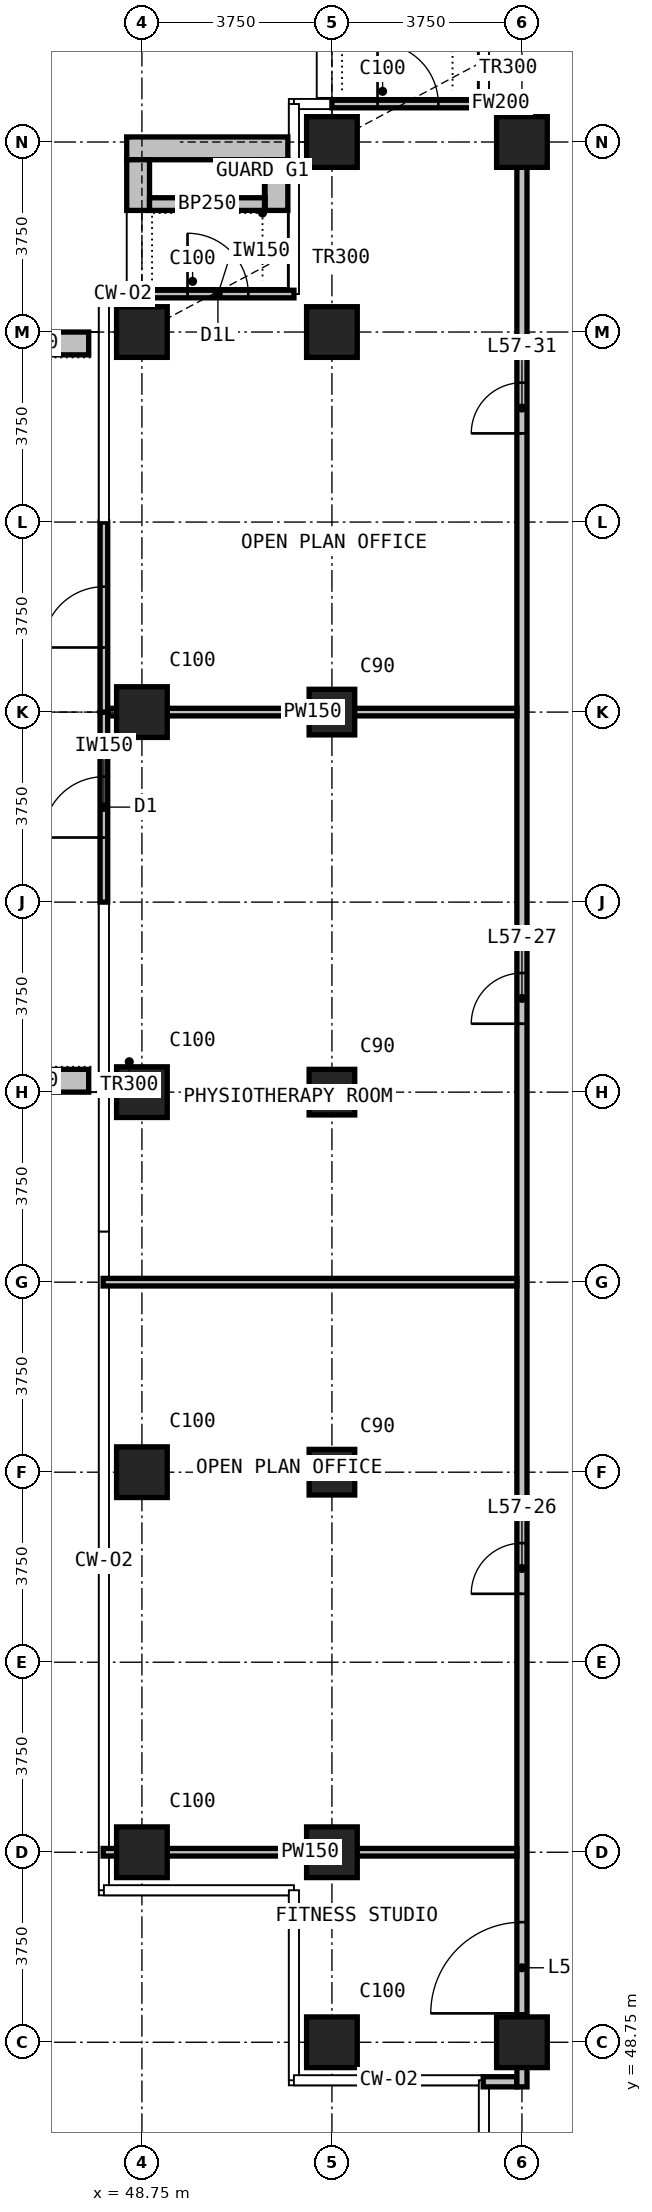
"""IFC4 building model, lengths in metres.
Left out: names, types, materials, properties, quantities, classifications, styles, units other than length and angle.
Written with IfcOpenShell. Run it as: python <this file> out.ifc"""

import sys

from ifc_helpers import new_model, si_unit, direction, frame, frame_2d, origin, origin_2d, place, context, subcontext, project, spatial, rectangle, extrude, element, fill, save


model = new_model("IFC4")
c1 = context("Model", 3, precision=1e-05, world=origin(), true_north=direction((0.0, 1.0)))
c2 = subcontext(c1, "Body", "Model", "MODEL_VIEW")
j1 = project(units=[si_unit("LENGTHUNIT", "METRE"), si_unit("PLANEANGLEUNIT", "RADIAN")], contexts=[c1])
p1 = place(None, origin())
s1 = spatial("IfcSite", under=j1, at=p1, CompositionType="ELEMENT")
p2 = place(p1, origin())
s2 = spatial("IfcBuilding", under=s1, at=p2, CompositionType="ELEMENT")
p3 = place(p2, frame((0.0, 0.0, 221.1)))
s3 = spatial("IfcBuildingStorey", under=s2, at=p3, CompositionType="ELEMENT", Elevation=221.1)
for number, where, z_axis, x_axis in (
    (1, (48.75, 52.5, 0.0), (0.0, 0.0, 1.0), (1.0, 0.0, 0.0)),
    (2, (48.75, 60.0, 0.0), (0.0, 0.0, 1.0), (1.0, 0.0, 0.0)),
    (3, (48.75, 67.5, 0.0), (0.0, 0.0, 1.0), (1.0, 0.0, 0.0)),
    (4, (48.75, 75.0, 0.0), (0.0, 0.0, 1.0), (1.0, 0.0, 0.0)),
    (5, (48.75, 82.5, 0.0), (0.0, 0.0, 1.0), (1.0, 0.0, 0.0)),
    (6, (52.5, 48.75, 0.0), (0.0, 0.0, 1.0), (1.0, 0.0, 0.0)),
    (7, (52.5, 52.5, 0.0), (0.0, 0.0, 1.0), (1.0, 0.0, 0.0)),
):
    element("IfcColumn", number, at=place(p3, frame(where, z_axis=z_axis, x_axis=x_axis)), inside=s3, PredefinedType="COLUMN", context=c2, shape_type="SweptSolid", body=[
        extrude(rectangle(XDim=1.0, YDim=1.0, at=origin_2d()), origin(), (0.0, 0.0, 1.0), 3.6),
    ])
for number, where, z_axis, x_axis in (
    (8, (52.5, 60.0, 0.0), (0.0, 0.0, 1.0), (1.0, 0.0, 0.0)),
    (9, (52.5, 67.5, 0.0), (0.0, 0.0, 1.0), (1.0, 0.0, 0.0)),
    (10, (52.5, 75.0, 0.0), (0.0, 0.0, 1.0), (1.0, 0.0, 0.0)),
):
    element("IfcColumn", number, at=place(p3, frame(where, z_axis=z_axis, x_axis=x_axis)), inside=s3, PredefinedType="COLUMN", context=c2, shape_type="SweptSolid", body=[
        extrude(rectangle(XDim=0.9, YDim=0.9, at=origin_2d()), origin(), (0.0, 0.0, 1.0), 3.6),
    ])
for number, where, z_axis, x_axis in (
    (11, (52.5, 82.5, 0.0), (0.0, 0.0, 1.0), (1.0, 0.0, 0.0)),
    (12, (52.5, 86.25, 0.0), (0.0, 0.0, 1.0), (1.0, 0.0, 0.0)),
    (13, (56.25, 48.75, 0.0), (0.0, 0.0, 1.0), (1.0, 0.0, 0.0)),
    (14, (56.25, 86.25, 0.0), (0.0, 0.0, 1.0), (1.0, 0.0, 0.0)),
):
    element("IfcColumn", number, at=place(p3, frame(where, z_axis=z_axis, x_axis=x_axis)), inside=s3, PredefinedType="COLUMN", context=c2, shape_type="SweptSolid", body=[
        extrude(rectangle(XDim=1.0, YDim=1.0, at=origin_2d()), origin(), (0.0, 0.0, 1.0), 3.6),
    ])
p4 = place(p3, frame((52.5, 87.0, 0.0), z_axis=(0.0, 0.0, 1.0), x_axis=(1.0, 0.0, 0.0)))
e15 = element("IfcWall", 15, at=p4, inside=s3, PredefinedType="SOLIDWALL", context=c2, shape_type="SweptSolid", body=[
    extrude(rectangle(XDim=3.0, YDim=0.15, at=frame_2d((1.5, 0.0))), origin(), (0.0, 0.0, 1.0), 3.3),
])
p5 = place(p4, frame((0.9, 0.0, 0.0)))
e16 = element("IfcOpeningElement", 16, at=p5, cuts=e15, PredefinedType="OPENING", context=c2, shape_type="SweptSolid", body=[
    extrude(rectangle(XDim=1.2, YDim=2.0, at=frame_2d((0.6, 1.0))), frame((0.0, 0.085, 0.0), z_axis=(0.0, -1.0, 0.0), x_axis=(1.0, 0.0, 0.0)), (0.0, 0.0, 1.0), 0.17),
])
p6 = place(p3, frame((48.75, 83.25, 0.0), z_axis=(0.0, 0.0, 1.0), x_axis=(1.0, 0.0, 0.0)))
e17 = element("IfcWall", 17, at=p6, inside=s3, PredefinedType="SOLIDWALL", context=c2, shape_type="SweptSolid", body=[
    extrude(rectangle(XDim=3.0, YDim=0.15, at=frame_2d((1.5, 0.0))), origin(), (0.0, 0.0, 1.0), 3.3),
])
p7 = place(p6, frame((0.9, 0.0, 0.0)))
e18 = element("IfcOpeningElement", 18, at=p7, cuts=e17, PredefinedType="OPENING", context=c2, shape_type="SweptSolid", body=[
    extrude(rectangle(XDim=1.2, YDim=2.0, at=frame_2d((0.6, 1.0))), frame((0.0, 0.085, 0.0), z_axis=(0.0, -1.0, 0.0), x_axis=(1.0, 0.0, 0.0)), (0.0, 0.0, 1.0), 0.17),
])
p8 = place(p3, frame((48.0, 71.25, 0.0), z_axis=(0.0, 0.0, 1.0), x_axis=(0.0, 1.0, 0.0)))
e19 = element("IfcWall", 19, at=p8, inside=s3, PredefinedType="SOLIDWALL", context=c2, shape_type="SweptSolid", body=[
    extrude(rectangle(XDim=3.75, YDim=0.15, at=frame_2d((1.875, 0.0))), origin(), (0.0, 0.0, 1.0), 3.3),
])
p9 = place(p8, frame((1.275, 0.0, 0.0)))
e20 = element("IfcOpeningElement", 20, at=p9, cuts=e19, PredefinedType="OPENING", context=c2, shape_type="SweptSolid", body=[
    extrude(rectangle(XDim=1.2, YDim=2.4, at=frame_2d((0.6, 1.2))), frame((0.0, 0.085, 0.0), z_axis=(0.0, -1.0, 0.0), x_axis=(1.0, 0.0, 0.0)), (0.0, 0.0, 1.0), 0.17),
])
p10 = place(p3, frame((48.0, 75.0, 0.0), z_axis=(0.0, 0.0, 1.0), x_axis=(0.0, 1.0, 0.0)))
e21 = element("IfcWall", 21, at=p10, inside=s3, PredefinedType="SOLIDWALL", context=c2, shape_type="SweptSolid", body=[
    extrude(rectangle(XDim=3.75, YDim=0.15, at=frame_2d((1.875, 0.0))), origin(), (0.0, 0.0, 1.0), 3.3),
])
p11 = place(p10, frame((1.275, 0.0, 0.0)))
e22 = element("IfcOpeningElement", 22, at=p11, cuts=e21, PredefinedType="OPENING", context=c2, shape_type="SweptSolid", body=[
    extrude(rectangle(XDim=1.2, YDim=2.4, at=frame_2d((0.6, 1.2))), frame((0.0, 0.085, 0.0), z_axis=(0.0, -1.0, 0.0), x_axis=(1.0, 0.0, 0.0)), (0.0, 0.0, 1.0), 0.17),
])
p12 = place(p3, frame((48.45, 86.125, 0.0), z_axis=(0.0, 0.0, 1.0), x_axis=(1.0, 0.0, 0.0)))
e23 = element("IfcWall", 23, at=p12, inside=s3, PredefinedType="USERDEFINED", context=c2, shape_type="SweptSolid", body=[
    extrude(rectangle(XDim=3.18, YDim=0.45, at=frame_2d((1.59, 0.0))), origin(), (0.0, 0.0, 1.0), 1.1),
])
for number, where, z_axis, x_axis in (
    (24, (48.675, 84.9, 0.0), (0.0, 0.0, 1.0), (0.0, 1.0, 0.0)),
    (25, (51.405, 84.9, 0.0), (0.0, 0.0, 1.0), (0.0, 1.0, 0.0)),
):
    element("IfcWall", number, at=place(p3, frame(where, z_axis=z_axis, x_axis=x_axis)), inside=s3, PredefinedType="USERDEFINED", context=c2, shape_type="SweptSolid", body=[
        extrude(rectangle(XDim=1.0, YDim=0.45, at=frame_2d((0.5, 0.0))), origin(), (0.0, 0.0, 1.0), 1.1),
    ])
p13 = place(p3, frame((48.9, 85.025, 0.0), z_axis=(0.0, 0.0, 1.0), x_axis=(1.0, 0.0, 0.0)))
e26 = element("IfcWall", 26, at=p13, inside=s3, PredefinedType="USERDEFINED", context=c2, shape_type="SweptSolid", body=[
    extrude(rectangle(XDim=2.28, YDim=0.25, at=frame_2d((1.14, 0.0))), origin(), (0.0, 0.0, 1.0), 1.0),
])
for number, where, z_axis, x_axis in (
    (27, (47.7, 67.725, 0.0), (0.0, 0.0, 1.0), (-1.0, 0.0, 0.0)),
    (28, (47.7, 82.275, 0.0), (0.0, 0.0, 1.0), (-1.0, 0.0, 0.0)),
):
    element("IfcWall", number, at=place(p3, frame(where, z_axis=z_axis, x_axis=x_axis)), inside=s3, PredefinedType="USERDEFINED", context=c2, shape_type="SweptSolid", body=[
        extrude(rectangle(XDim=2.35, YDim=0.45, at=frame_2d((1.175, 0.0))), origin(), (0.0, 0.0, 1.0), 1.1),
    ])
p14 = place(p3, frame((55.485, 47.97, 0.0), z_axis=(0.0, 0.0, 1.0), x_axis=(1.0, 0.0, 0.0)))
e29 = element("IfcWall", 29, at=p14, inside=s3, PredefinedType="PARTITIONING", context=c2, shape_type="SweptSolid", body=[
    extrude(rectangle(XDim=0.665, YDim=0.2, at=frame_2d((0.333, 0.0))), origin(), (0.0, 0.0, 1.0), 3.3),
])
p15 = place(p3, frame((55.51, 87.03, 0.0), z_axis=(0.0, 0.0, 1.0), x_axis=(1.0, 0.0, 0.0)))
e30 = element("IfcWall", 30, at=p15, inside=s3, PredefinedType="PARTITIONING", context=c2, shape_type="SweptSolid", body=[
    extrude(rectangle(XDim=0.64, YDim=0.2, at=frame_2d((0.32, 0.0))), origin(), (0.0, 0.0, 1.0), 3.3),
])
p16 = place(p3, frame((56.25, 47.87, 0.0), z_axis=(0.0, 0.0, 1.0), x_axis=(0.0, 1.0, 0.0)))
e31 = element("IfcWall", 31, at=p16, inside=s3, PredefinedType="PARTITIONING", context=c2, shape_type="SweptSolid", body=[
    extrude(rectangle(XDim=39.26, YDim=0.2, at=frame_2d((19.63, 0.0))), origin(), (0.0, 0.0, 1.0), 3.3),
])
p17 = place(p16, frame((1.45, 0.0, 0.0)))
e32 = element("IfcOpeningElement", 32, at=p17, cuts=e31, PredefinedType="OPENING", context=c2, shape_type="SweptSolid", body=[
    extrude(rectangle(XDim=1.8, YDim=2.2, at=frame_2d((0.9, 1.1))), frame((0.0, 0.11, 0.0), z_axis=(0.0, -1.0, 0.0), x_axis=(1.0, 0.0, 0.0)), (0.0, 0.0, 1.0), 0.22),
])
p18 = place(p16, frame((9.73, 0.0, 0.0)))
e33 = element("IfcOpeningElement", 33, at=p18, cuts=e31, PredefinedType="OPENING", context=c2, shape_type="SweptSolid", body=[
    extrude(rectangle(XDim=1.0, YDim=2.2, at=frame_2d((0.5, 1.1))), frame((0.0, 0.11, 0.0), z_axis=(0.0, -1.0, 0.0), x_axis=(1.0, 0.0, 0.0)), (0.0, 0.0, 1.0), 0.22),
])
p19 = place(p16, frame((20.98, 0.0, 0.0)))
e34 = element("IfcOpeningElement", 34, at=p19, cuts=e31, PredefinedType="OPENING", context=c2, shape_type="SweptSolid", body=[
    extrude(rectangle(XDim=1.0, YDim=2.2, at=frame_2d((0.5, 1.1))), frame((0.0, 0.11, 0.0), z_axis=(0.0, -1.0, 0.0), x_axis=(1.0, 0.0, 0.0)), (0.0, 0.0, 1.0), 0.22),
])
p20 = place(p16, frame((32.63, 0.0, 0.0)))
e35 = element("IfcOpeningElement", 35, at=p20, cuts=e31, PredefinedType="OPENING", context=c2, shape_type="SweptSolid", body=[
    extrude(rectangle(XDim=1.0, YDim=2.2, at=frame_2d((0.5, 1.1))), frame((0.0, 0.11, 0.0), z_axis=(0.0, -1.0, 0.0), x_axis=(1.0, 0.0, 0.0)), (0.0, 0.0, 1.0), 0.22),
])
for number, where, z_axis, x_axis in (
    (36, (47.985, 52.5, 0.0), (0.0, 0.0, 1.0), (1.0, 0.0, 0.0)),
    (37, (47.985, 63.75, 0.0), (0.0, 0.0, 1.0), (1.0, 0.0, 0.0)),
):
    element("IfcWall", number, at=place(p3, frame(where, z_axis=z_axis, x_axis=x_axis)), inside=s3, PredefinedType="PARTITIONING", context=c2, shape_type="SweptSolid", body=[
        extrude(rectangle(XDim=8.165, YDim=0.15, at=frame_2d((4.083, 0.0))), origin(), (0.0, 0.0, 1.0), 3.3),
    ])
p21 = place(p3, frame((48.085, 75.0, 0.0), z_axis=(0.0, 0.0, 1.0), x_axis=(1.0, 0.0, 0.0)))
e38 = element("IfcWall", 38, at=p21, inside=s3, PredefinedType="PARTITIONING", context=c2, shape_type="SweptSolid", body=[
    extrude(rectangle(XDim=8.065, YDim=0.15, at=frame_2d((4.032, 0.0))), origin(), (0.0, 0.0, 1.0), 3.3),
])
p22 = place(p5, origin())
e39 = element("IfcDoor", 39, at=p22, inside=s3, OperationType="SINGLE_SWING_LEFT", PredefinedType="DOOR", context=c2, shape_type="SweptSolid", body=[
    extrude(rectangle(XDim=1.2, YDim=2.0, at=frame_2d((0.6, 1.0))), frame((0.0, 0.025, 0.0), z_axis=(0.0, -1.0, 0.0), x_axis=(1.0, 0.0, 0.0)), (0.0, 0.0, 1.0), 0.05),
])
fill(e16, e39)
p23 = place(p7, origin())
e40 = element("IfcDoor", 40, at=p23, inside=s3, OperationType="SINGLE_SWING_LEFT", PredefinedType="DOOR", context=c2, shape_type="SweptSolid", body=[
    extrude(rectangle(XDim=1.2, YDim=2.0, at=frame_2d((0.6, 1.0))), frame((0.0, 0.025, 0.0), z_axis=(0.0, -1.0, 0.0), x_axis=(1.0, 0.0, 0.0)), (0.0, 0.0, 1.0), 0.05),
])
fill(e18, e40)
p24 = place(p9, origin())
e41 = element("IfcDoor", 41, at=p24, inside=s3, OperationType="SINGLE_SWING_LEFT", PredefinedType="DOOR", context=c2, shape_type="SweptSolid", body=[
    extrude(rectangle(XDim=1.2, YDim=2.4, at=frame_2d((0.6, 1.2))), frame((0.0, 0.025, 0.0), z_axis=(0.0, -1.0, 0.0), x_axis=(1.0, 0.0, 0.0)), (0.0, 0.0, 1.0), 0.05),
])
fill(e20, e41)
p25 = place(p11, origin())
e42 = element("IfcDoor", 42, at=p25, inside=s3, OperationType="SINGLE_SWING_LEFT", PredefinedType="DOOR", context=c2, shape_type="SweptSolid", body=[
    extrude(rectangle(XDim=1.2, YDim=2.4, at=frame_2d((0.6, 1.2))), frame((0.0, 0.025, 0.0), z_axis=(0.0, -1.0, 0.0), x_axis=(1.0, 0.0, 0.0)), (0.0, 0.0, 1.0), 0.05),
])
fill(e22, e42)
p26 = place(p17, origin())
e43 = element("IfcDoor", 43, at=p26, inside=s3, OperationType="DOUBLE_DOOR_SINGLE_SWING", PredefinedType="DOOR", context=c2, shape_type="SweptSolid", body=[
    extrude(rectangle(XDim=1.8, YDim=2.2, at=frame_2d((0.9, 1.1))), frame((0.0, 0.025, 0.0), z_axis=(0.0, -1.0, 0.0), x_axis=(1.0, 0.0, 0.0)), (0.0, 0.0, 1.0), 0.05),
])
fill(e32, e43)
p27 = place(p18, origin())
e44 = element("IfcDoor", 44, at=p27, inside=s3, OperationType="SINGLE_SWING_LEFT", PredefinedType="DOOR", context=c2, shape_type="SweptSolid", body=[
    extrude(rectangle(XDim=1.0, YDim=2.2, at=frame_2d((0.5, 1.1))), frame((0.0, 0.025, 0.0), z_axis=(0.0, -1.0, 0.0), x_axis=(1.0, 0.0, 0.0)), (0.0, 0.0, 1.0), 0.05),
])
fill(e33, e44)
p28 = place(p19, origin())
e45 = element("IfcDoor", 45, at=p28, inside=s3, OperationType="SINGLE_SWING_RIGHT", PredefinedType="DOOR", context=c2, shape_type="SweptSolid", body=[
    extrude(rectangle(XDim=1.0, YDim=2.2, at=frame_2d((0.5, 1.1))), frame((0.0, 0.025, 0.0), z_axis=(0.0, -1.0, 0.0), x_axis=(1.0, 0.0, 0.0)), (0.0, 0.0, 1.0), 0.05),
])
fill(e34, e45)
p29 = place(p20, origin())
e46 = element("IfcDoor", 46, at=p29, inside=s3, OperationType="SINGLE_SWING_LEFT", PredefinedType="DOOR", context=c2, shape_type="SweptSolid", body=[
    extrude(rectangle(XDim=1.0, YDim=2.2, at=frame_2d((0.5, 1.1))), frame((0.0, 0.025, 0.0), z_axis=(0.0, -1.0, 0.0), x_axis=(1.0, 0.0, 0.0)), (0.0, 0.0, 1.0), 0.05),
])
fill(e35, e46)
save(model, sys.argv[1])
